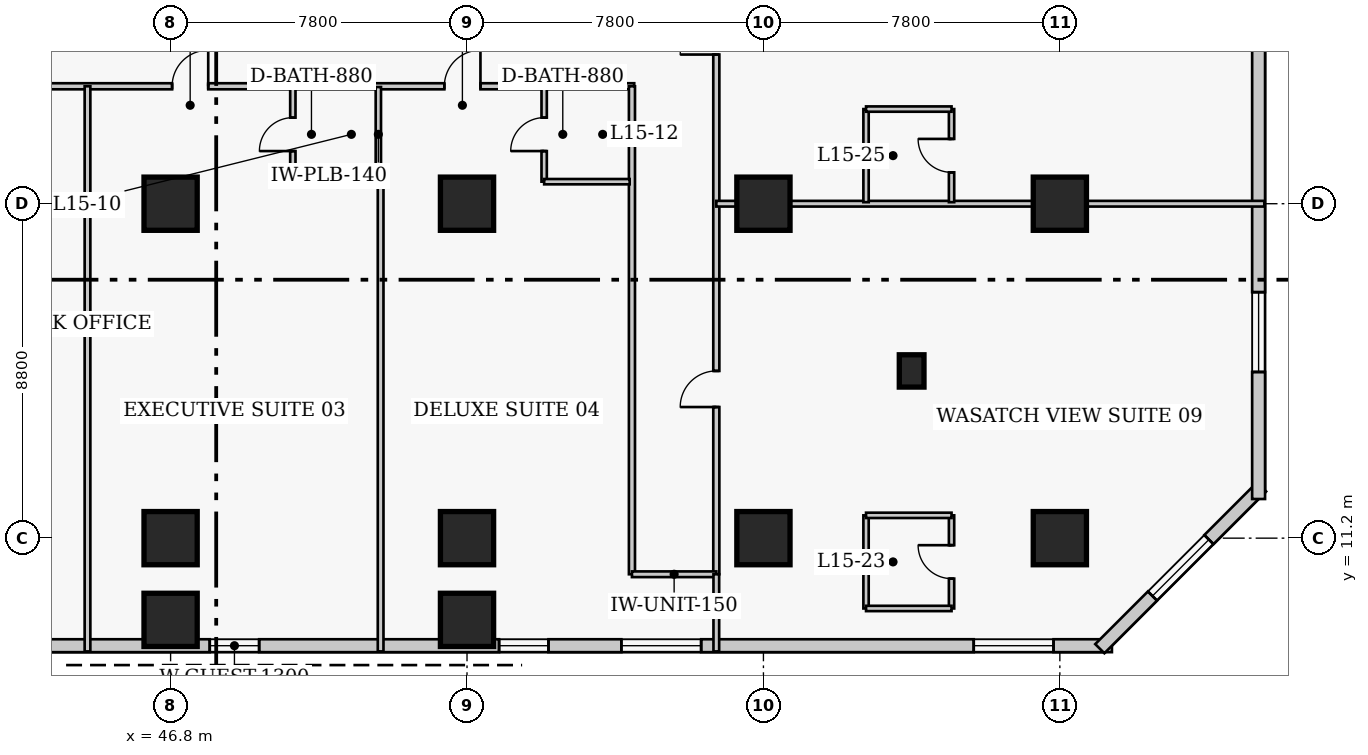
"""IFC4 building model, lengths in metres.
Left out: names, types, materials, properties, quantities, classifications, styles, units other than length and angle.
Written with IfcOpenShell. Run it as: python <this file> out.ifc"""

import sys

from ifc_helpers import new_model, si_unit, direction, frame, frame_2d, origin, origin_2d, place, context, subcontext, project, spatial, rectangle, extrude, element, fill, save


model = new_model("IFC4")
c1 = context("Model", 3, precision=1e-05, world=origin(), true_north=direction((0.0, 1.0)))
c2 = subcontext(c1, "Body", "Model", "MODEL_VIEW")
j1 = project(units=[si_unit("LENGTHUNIT", "METRE"), si_unit("PLANEANGLEUNIT", "RADIAN")], contexts=[c1])
p1 = place(None, origin())
s1 = spatial("IfcSite", under=j1, at=p1, CompositionType="ELEMENT")
p2 = place(p1, origin())
s2 = spatial("IfcBuilding", under=s1, at=p2, CompositionType="ELEMENT")
p3 = place(p2, frame((0.0, 0.0, 64.0)))
s3 = spatial("IfcBuildingStorey", under=s2, at=p3, CompositionType="ELEMENT", Elevation=64.0)
for number, where, z_axis, x_axis in (
    (1, (46.8, 11.2, 0.0), (0.0, 0.0, 1.0), (1.0, 0.0, 0.0)),
    (2, (46.8, 20.0, 0.0), (0.0, 0.0, 1.0), (1.0, 0.0, 0.0)),
    (3, (54.6, 11.2, 0.0), (0.0, 0.0, 1.0), (1.0, 0.0, 0.0)),
    (4, (54.6, 20.0, 0.0), (0.0, 0.0, 1.0), (1.0, 0.0, 0.0)),
    (5, (62.4, 11.2, 0.0), (0.0, 0.0, 1.0), (1.0, 0.0, 0.0)),
    (6, (62.4, 20.0, 0.0), (0.0, 0.0, 1.0), (1.0, 0.0, 0.0)),
    (7, (70.2, 11.2, 0.0), (0.0, 0.0, 1.0), (1.0, 0.0, 0.0)),
    (8, (70.2, 20.0, 0.0), (0.0, 0.0, 1.0), (1.0, 0.0, 0.0)),
    (9, (46.8, 9.05, 0.0), (0.0, 0.0, 1.0), (1.0, 0.0, 0.0)),
    (10, (54.6, 9.05, 0.0), (0.0, 0.0, 1.0), (1.0, 0.0, 0.0)),
):
    element("IfcColumn", number, at=place(p3, frame(where, z_axis=z_axis, x_axis=x_axis)), inside=s3, PredefinedType="COLUMN", context=c2, shape_type="SweptSolid", body=[
        extrude(rectangle(XDim=1.4, YDim=1.4, at=origin_2d()), origin(), (0.0, 0.0, 1.0), 3.8),
    ])
p4 = place(p3, frame((66.3, 15.6, 0.0), z_axis=(0.0, 0.0, 1.0), x_axis=(1.0, 0.0, 0.0)))
e11 = element("IfcColumn", 11, at=p4, inside=s3, PredefinedType="PILASTER", context=c2, shape_type="SweptSolid", body=[
    extrude(rectangle(XDim=0.65, YDim=0.85, at=origin_2d()), origin(), (0.0, 0.0, 1.0), 3.8),
])
p5 = place(p3, frame((41.68, 8.37, 0.0), z_axis=(0.0, 0.0, 1.0), x_axis=(1.0, 0.0, 0.0)))
e12 = element("IfcWall", 12, at=p5, inside=s3, PredefinedType="SOLIDWALL", context=c2, shape_type="SweptSolid", body=[
    extrude(rectangle(XDim=29.89, YDim=0.34, at=frame_2d((14.945, 0.0))), origin(), (0.0, 0.0, 1.0), 3.54),
])
p6 = place(p5, frame((16.981, 0.0, 0.85)))
e13 = element("IfcOpeningElement", 13, at=p6, cuts=e12, PredefinedType="OPENING", context=c2, shape_type="SweptSolid", body=[
    extrude(rectangle(XDim=2.1, YDim=1.85, at=frame_2d((1.05, 0.925))), frame((0.0, 0.18, 0.0), z_axis=(0.0, -1.0, 0.0), x_axis=(1.0, 0.0, 0.0)), (0.0, 0.0, 1.0), 0.36),
])
p7 = place(p5, frame((26.254, 0.0, 0.85)))
e14 = element("IfcOpeningElement", 14, at=p7, cuts=e12, PredefinedType="OPENING", context=c2, shape_type="SweptSolid", body=[
    extrude(rectangle(XDim=2.1, YDim=1.85, at=frame_2d((1.05, 0.925))), frame((0.0, 0.18, 0.0), z_axis=(0.0, -1.0, 0.0), x_axis=(1.0, 0.0, 0.0)), (0.0, 0.0, 1.0), 0.36),
])
p8 = place(p5, frame((6.15, 0.0, 0.85)))
e15 = element("IfcOpeningElement", 15, at=p8, cuts=e12, PredefinedType="OPENING", context=c2, shape_type="SweptSolid", body=[
    extrude(rectangle(XDim=1.3, YDim=1.7, at=frame_2d((0.65, 0.85))), frame((0.0, 0.18, 0.0), z_axis=(0.0, -1.0, 0.0), x_axis=(1.0, 0.0, 0.0)), (0.0, 0.0, 1.0), 0.36),
])
p9 = place(p5, frame((13.763, 0.0, 0.85)))
e16 = element("IfcOpeningElement", 16, at=p9, cuts=e12, PredefinedType="OPENING", context=c2, shape_type="SweptSolid", body=[
    extrude(rectangle(XDim=1.3, YDim=1.7, at=frame_2d((0.65, 0.85))), frame((0.0, 0.18, 0.0), z_axis=(0.0, -1.0, 0.0), x_axis=(1.0, 0.0, 0.0)), (0.0, 0.0, 1.0), 0.36),
])
p10 = place(p3, frame((71.251, 8.292, 0.0), z_axis=(0.0, 0.0, 1.0), x_axis=(0.707106781187, 0.707106781187, 0.0)))
e17 = element("IfcWall", 17, at=p10, inside=s3, PredefinedType="SOLIDWALL", context=c2, shape_type="SweptSolid", body=[
    extrude(rectangle(XDim=6.02, YDim=0.34, at=frame_2d((3.01, 0.0))), origin(), (0.0, 0.0, 1.0), 3.54),
])
p11 = place(p10, frame((1.96, 0.0, 0.85)))
e18 = element("IfcOpeningElement", 18, at=p11, cuts=e17, PredefinedType="OPENING", context=c2, shape_type="SweptSolid", body=[
    extrude(rectangle(XDim=2.1, YDim=1.85, at=frame_2d((1.05, 0.925))), frame((0.0, 0.18, 0.0), z_axis=(0.0, -1.0, 0.0), x_axis=(1.0, 0.0, 0.0)), (0.0, 0.0, 1.0), 0.36),
])
p12 = place(p3, frame((75.43, 12.23, 0.0), z_axis=(0.0, 0.0, 1.0), x_axis=(0.0, 1.0, 0.0)))
e19 = element("IfcWall", 19, at=p12, inside=s3, PredefinedType="SOLIDWALL", context=c2, shape_type="SweptSolid", body=[
    extrude(rectangle(XDim=35.14, YDim=0.34, at=frame_2d((17.57, 0.0))), origin(), (0.0, 0.0, 1.0), 3.54),
])
p13 = place(p12, frame((3.343, 0.0, 0.85)))
e20 = element("IfcOpeningElement", 20, at=p13, cuts=e19, PredefinedType="OPENING", context=c2, shape_type="SweptSolid", body=[
    extrude(rectangle(XDim=2.1, YDim=1.85, at=frame_2d((1.05, 0.925))), frame((0.0, 0.18, 0.0), z_axis=(0.0, -1.0, 0.0), x_axis=(1.0, 0.0, 0.0)), (0.0, 0.0, 1.0), 0.36),
])
p14 = place(p12, frame((12.127, 0.0, 0.85)))
e21 = element("IfcOpeningElement", 21, at=p14, cuts=e19, PredefinedType="OPENING", context=c2, shape_type="SweptSolid", body=[
    extrude(rectangle(XDim=2.1, YDim=1.85, at=frame_2d((1.05, 0.925))), frame((0.0, 0.18, 0.0), z_axis=(0.0, -1.0, 0.0), x_axis=(1.0, 0.0, 0.0)), (0.0, 0.0, 1.0), 0.36),
])
p15 = place(p12, frame((20.913, 0.0, 0.85)))
e22 = element("IfcOpeningElement", 22, at=p15, cuts=e19, PredefinedType="OPENING", context=c2, shape_type="SweptSolid", body=[
    extrude(rectangle(XDim=2.1, YDim=1.85, at=frame_2d((1.05, 0.925))), frame((0.0, 0.18, 0.0), z_axis=(0.0, -1.0, 0.0), x_axis=(1.0, 0.0, 0.0)), (0.0, 0.0, 1.0), 0.36),
])
p16 = place(p12, frame((29.698, 0.0, 0.85)))
e23 = element("IfcOpeningElement", 23, at=p16, cuts=e19, PredefinedType="OPENING", context=c2, shape_type="SweptSolid", body=[
    extrude(rectangle(XDim=2.1, YDim=1.85, at=frame_2d((1.05, 0.925))), frame((0.0, 0.18, 0.0), z_axis=(0.0, -1.0, 0.0), x_axis=(1.0, 0.0, 0.0)), (0.0, 0.0, 1.0), 0.36),
])
p17 = place(p3, frame((35.8, 23.09, 0.0), z_axis=(0.0, 0.0, 1.0), x_axis=(1.0, 0.0, 0.0)))
e24 = element("IfcWall", 24, at=p17, inside=s3, PredefinedType="PARTITIONING", context=c2, shape_type="SweptSolid", body=[
    extrude(rectangle(XDim=23.2, YDim=0.16, at=frame_2d((11.6, 0.0))), origin(), (0.0, 0.0, 1.0), 3.54),
])
p18 = place(p17, frame((3.907, 0.0, 0.0)))
e25 = element("IfcOpeningElement", 25, at=p18, cuts=e24, PredefinedType="OPENING", context=c2, shape_type="SweptSolid", body=[
    extrude(rectangle(XDim=1.0, YDim=2.15, at=frame_2d((0.5, 1.075))), frame((0.0, 0.09, 0.0), z_axis=(0.0, -1.0, 0.0), x_axis=(1.0, 0.0, 0.0)), (0.0, 0.0, 1.0), 0.18),
])
p19 = place(p17, frame((11.04, 0.0, 0.0)))
e26 = element("IfcOpeningElement", 26, at=p19, cuts=e24, PredefinedType="OPENING", context=c2, shape_type="SweptSolid", body=[
    extrude(rectangle(XDim=0.95, YDim=2.1, at=frame_2d((0.475, 1.05))), frame((0.0, 0.09, 0.0), z_axis=(0.0, -1.0, 0.0), x_axis=(1.0, 0.0, 0.0)), (0.0, 0.0, 1.0), 0.18),
])
p20 = place(p17, frame((18.203, 0.0, 0.0)))
e27 = element("IfcOpeningElement", 27, at=p20, cuts=e24, PredefinedType="OPENING", context=c2, shape_type="SweptSolid", body=[
    extrude(rectangle(XDim=0.95, YDim=2.1, at=frame_2d((0.475, 1.05))), frame((0.0, 0.09, 0.0), z_axis=(0.0, -1.0, 0.0), x_axis=(1.0, 0.0, 0.0)), (0.0, 0.0, 1.0), 0.18),
])
p21 = place(p3, frame((61.16, 10.25, 0.0), z_axis=(0.0, 0.0, 1.0), x_axis=(0.0, 1.0, 0.0)))
e28 = element("IfcWall", 28, at=p21, inside=s3, PredefinedType="PARTITIONING", context=c2, shape_type="SweptSolid", body=[
    extrude(rectangle(XDim=30.4, YDim=0.16, at=frame_2d((15.2, 0.0))), origin(), (0.0, 0.0, 1.0), 3.54),
])
p22 = place(p21, frame((4.4, 0.0, 0.0)))
e29 = element("IfcOpeningElement", 29, at=p22, cuts=e28, PredefinedType="OPENING", context=c2, shape_type="SweptSolid", body=[
    extrude(rectangle(XDim=0.95, YDim=2.1, at=frame_2d((0.475, 1.05))), frame((0.0, 0.09, 0.0), z_axis=(0.0, -1.0, 0.0), x_axis=(1.0, 0.0, 0.0)), (0.0, 0.0, 1.0), 0.18),
])
p23 = place(p21, frame((13.675, 0.0, 0.0)))
e30 = element("IfcOpeningElement", 30, at=p23, cuts=e28, PredefinedType="OPENING", context=c2, shape_type="SweptSolid", body=[
    extrude(rectangle(XDim=0.95, YDim=2.1, at=frame_2d((0.475, 1.05))), frame((0.0, 0.09, 0.0), z_axis=(0.0, -1.0, 0.0), x_axis=(1.0, 0.0, 0.0)), (0.0, 0.0, 1.0), 0.18),
])
p24 = place(p21, frame((21.8, 0.0, 0.0)))
e31 = element("IfcOpeningElement", 31, at=p24, cuts=e28, PredefinedType="OPENING", context=c2, shape_type="SweptSolid", body=[
    extrude(rectangle(XDim=0.95, YDim=2.1, at=frame_2d((0.475, 1.05))), frame((0.0, 0.09, 0.0), z_axis=(0.0, -1.0, 0.0), x_axis=(1.0, 0.0, 0.0)), (0.0, 0.0, 1.0), 0.18),
])
p25 = place(p21, frame((28.96, 0.0, 0.0)))
e32 = element("IfcOpeningElement", 32, at=p25, cuts=e28, PredefinedType="OPENING", context=c2, shape_type="SweptSolid", body=[
    extrude(rectangle(XDim=1.0, YDim=2.15, at=frame_2d((0.5, 1.075))), frame((0.0, 0.09, 0.0), z_axis=(0.0, -1.0, 0.0), x_axis=(1.0, 0.0, 0.0)), (0.0, 0.0, 1.0), 0.18),
])
p26 = place(p3, frame((58.94, 10.25, 0.0), z_axis=(0.0, 0.0, 1.0), x_axis=(0.0, 1.0, 0.0)))
e33 = element("IfcWall", 33, at=p26, inside=s3, PredefinedType="PARTITIONING", context=c2, shape_type="SweptSolid", body=[
    extrude(rectangle(XDim=12.84, YDim=0.16, at=frame_2d((6.42, 0.0))), origin(), (0.0, 0.0, 1.0), 3.54),
])
p27 = place(p3, frame((58.94, 10.25, 0.0), z_axis=(0.0, 0.0, 1.0), x_axis=(1.0, 0.0, 0.0)))
e34 = element("IfcWall", 34, at=p27, inside=s3, PredefinedType="PARTITIONING", context=c2, shape_type="SweptSolid", body=[
    extrude(rectangle(XDim=2.22, YDim=0.15, at=frame_2d((1.11, 0.0))), origin(), (0.0, 0.0, 1.0), 3.54),
])
p28 = place(p3, frame((44.613, 8.22, 0.0), z_axis=(0.0, 0.0, 1.0), x_axis=(0.0, 1.0, 0.0)))
e35 = element("IfcWall", 35, at=p28, inside=s3, PredefinedType="PARTITIONING", context=c2, shape_type="SweptSolid", body=[
    extrude(rectangle(XDim=14.87, YDim=0.15, at=frame_2d((7.435, 0.0))), origin(), (0.0, 0.0, 1.0), 3.54),
])
p29 = place(p3, frame((50.017, 20.58, 0.0), z_axis=(0.0, 0.0, 1.0), x_axis=(0.0, 1.0, 0.0)))
e36 = element("IfcWall", 36, at=p29, inside=s3, PredefinedType="PLUMBINGWALL", context=c2, shape_type="SweptSolid", body=[
    extrude(rectangle(XDim=2.49, YDim=0.14, at=frame_2d((1.245, 0.0))), origin(), (0.0, 0.0, 1.0), 3.54),
])
p30 = place(p29, frame((0.805, 0.0, 0.0)))
e37 = element("IfcOpeningElement", 37, at=p30, cuts=e36, PredefinedType="OPENING", context=c2, shape_type="SweptSolid", body=[
    extrude(rectangle(XDim=0.88, YDim=2.05, at=frame_2d((0.44, 1.025))), frame((0.0, 0.08, 0.0), z_axis=(0.0, -1.0, 0.0), x_axis=(1.0, 0.0, 0.0)), (0.0, 0.0, 1.0), 0.16),
])
p31 = place(p3, frame((52.267, 20.58, 0.0), z_axis=(0.0, 0.0, 1.0), x_axis=(0.0, 1.0, 0.0)))
e38 = element("IfcWall", 38, at=p31, inside=s3, PredefinedType="PLUMBINGWALL", context=c2, shape_type="SweptSolid", body=[
    extrude(rectangle(XDim=2.49, YDim=0.14, at=frame_2d((1.245, 0.0))), origin(), (0.0, 0.0, 1.0), 3.54),
])
p32 = place(p3, frame((50.017, 20.58, 0.0), z_axis=(0.0, 0.0, 1.0), x_axis=(1.0, 0.0, 0.0)))
e39 = element("IfcWall", 39, at=p32, inside=s3, PredefinedType="PLUMBINGWALL", context=c2, shape_type="SweptSolid", body=[
    extrude(rectangle(XDim=2.25, YDim=0.14, at=frame_2d((1.125, 0.0))), origin(), (0.0, 0.0, 1.0), 3.54),
])
p33 = place(p3, frame((52.327, 8.22, 0.0), z_axis=(0.0, 0.0, 1.0), x_axis=(0.0, 1.0, 0.0)))
e40 = element("IfcWall", 40, at=p33, inside=s3, PredefinedType="PARTITIONING", context=c2, shape_type="SweptSolid", body=[
    extrude(rectangle(XDim=12.36, YDim=0.15, at=frame_2d((6.18, 0.0))), origin(), (0.0, 0.0, 1.0), 3.54),
])
p34 = place(p3, frame((56.63, 20.58, 0.0), z_axis=(0.0, 0.0, 1.0), x_axis=(0.0, 1.0, 0.0)))
e41 = element("IfcWall", 41, at=p34, inside=s3, PredefinedType="PLUMBINGWALL", context=c2, shape_type="SweptSolid", body=[
    extrude(rectangle(XDim=2.49, YDim=0.14, at=frame_2d((1.245, 0.0))), origin(), (0.0, 0.0, 1.0), 3.54),
])
p35 = place(p34, frame((0.805, 0.0, 0.0)))
e42 = element("IfcOpeningElement", 42, at=p35, cuts=e41, PredefinedType="OPENING", context=c2, shape_type="SweptSolid", body=[
    extrude(rectangle(XDim=0.88, YDim=2.05, at=frame_2d((0.44, 1.025))), frame((0.0, 0.08, 0.0), z_axis=(0.0, -1.0, 0.0), x_axis=(1.0, 0.0, 0.0)), (0.0, 0.0, 1.0), 0.16),
])
p36 = place(p3, frame((56.63, 20.58, 0.0), z_axis=(0.0, 0.0, 1.0), x_axis=(1.0, 0.0, 0.0)))
e43 = element("IfcWall", 43, at=p36, inside=s3, PredefinedType="PLUMBINGWALL", context=c2, shape_type="SweptSolid", body=[
    extrude(rectangle(XDim=2.25, YDim=0.14, at=frame_2d((1.125, 0.0))), origin(), (0.0, 0.0, 1.0), 3.54),
])
p37 = place(p3, frame((61.16, 8.22, 0.0), z_axis=(0.0, 0.0, 1.0), x_axis=(0.0, 1.0, 0.0)))
e44 = element("IfcWall", 44, at=p37, inside=s3, PredefinedType="PARTITIONING", context=c2, shape_type="SweptSolid", body=[
    extrude(rectangle(XDim=2.03, YDim=0.15, at=frame_2d((1.015, 0.0))), origin(), (0.0, 0.0, 1.0), 3.54),
])
p38 = place(p3, frame((65.1, 9.35, 0.0), z_axis=(0.0, 0.0, 1.0), x_axis=(0.0, 1.0, 0.0)))
e45 = element("IfcWall", 45, at=p38, inside=s3, PredefinedType="PLUMBINGWALL", context=c2, shape_type="SweptSolid", body=[
    extrude(rectangle(XDim=2.45, YDim=0.14, at=frame_2d((1.225, 0.0))), origin(), (0.0, 0.0, 1.0), 3.54),
])
p39 = place(p3, frame((67.35, 9.35, 0.0), z_axis=(0.0, 0.0, 1.0), x_axis=(0.0, 1.0, 0.0)))
e46 = element("IfcWall", 46, at=p39, inside=s3, PredefinedType="PLUMBINGWALL", context=c2, shape_type="SweptSolid", body=[
    extrude(rectangle(XDim=2.45, YDim=0.14, at=frame_2d((1.225, 0.0))), origin(), (0.0, 0.0, 1.0), 3.54),
])
p40 = place(p39, frame((0.785, 0.0, 0.0)))
e47 = element("IfcOpeningElement", 47, at=p40, cuts=e46, PredefinedType="OPENING", context=c2, shape_type="SweptSolid", body=[
    extrude(rectangle(XDim=0.88, YDim=2.05, at=frame_2d((0.44, 1.025))), frame((0.0, 0.08, 0.0), z_axis=(0.0, -1.0, 0.0), x_axis=(1.0, 0.0, 0.0)), (0.0, 0.0, 1.0), 0.16),
])
for number, where, z_axis, x_axis in (
    (48, (65.1, 9.35, 0.0), (0.0, 0.0, 1.0), (1.0, 0.0, 0.0)),
    (49, (65.1, 11.8, 0.0), (0.0, 0.0, 1.0), (1.0, 0.0, 0.0)),
):
    element("IfcWall", number, at=place(p3, frame(where, z_axis=z_axis, x_axis=x_axis)), inside=s3, PredefinedType="PLUMBINGWALL", context=c2, shape_type="SweptSolid", body=[
        extrude(rectangle(XDim=2.25, YDim=0.14, at=frame_2d((1.125, 0.0))), origin(), (0.0, 0.0, 1.0), 3.54),
    ])
p41 = place(p3, frame((61.16, 20.0, 0.0), z_axis=(0.0, 0.0, 1.0), x_axis=(1.0, 0.0, 0.0)))
e50 = element("IfcWall", 50, at=p41, inside=s3, PredefinedType="PARTITIONING", context=c2, shape_type="SweptSolid", body=[
    extrude(rectangle(XDim=14.42, YDim=0.15, at=frame_2d((7.21, 0.0))), origin(), (0.0, 0.0, 1.0), 2.593),
])
p42 = place(p3, frame((65.1, 20.04, 0.0), z_axis=(0.0, 0.0, 1.0), x_axis=(0.0, 1.0, 0.0)))
e51 = element("IfcWall", 51, at=p42, inside=s3, PredefinedType="PLUMBINGWALL", context=c2, shape_type="SweptSolid", body=[
    extrude(rectangle(XDim=2.45, YDim=0.14, at=frame_2d((1.225, 0.0))), origin(), (0.0, 0.0, 1.0), 3.54),
])
p43 = place(p3, frame((67.35, 20.04, 0.0), z_axis=(0.0, 0.0, 1.0), x_axis=(0.0, 1.0, 0.0)))
e52 = element("IfcWall", 52, at=p43, inside=s3, PredefinedType="PLUMBINGWALL", context=c2, shape_type="SweptSolid", body=[
    extrude(rectangle(XDim=2.45, YDim=0.14, at=frame_2d((1.225, 0.0))), origin(), (0.0, 0.0, 1.0), 3.54),
])
p44 = place(p43, frame((0.785, 0.0, 0.0)))
e53 = element("IfcOpeningElement", 53, at=p44, cuts=e52, PredefinedType="OPENING", context=c2, shape_type="SweptSolid", body=[
    extrude(rectangle(XDim=0.88, YDim=2.05, at=frame_2d((0.44, 1.025))), frame((0.0, 0.08, 0.0), z_axis=(0.0, -1.0, 0.0), x_axis=(1.0, 0.0, 0.0)), (0.0, 0.0, 1.0), 0.16),
])
p45 = place(p3, frame((65.1, 22.49, 0.0), z_axis=(0.0, 0.0, 1.0), x_axis=(1.0, 0.0, 0.0)))
e54 = element("IfcWall", 54, at=p45, inside=s3, PredefinedType="PLUMBINGWALL", context=c2, shape_type="SweptSolid", body=[
    extrude(rectangle(XDim=2.25, YDim=0.14, at=frame_2d((1.125, 0.0))), origin(), (0.0, 0.0, 1.0), 3.54),
])
p46 = place(p6, origin())
e55 = element("IfcWindow", 55, at=p46, inside=s3, PartitioningType="SINGLE_PANEL", PredefinedType="WINDOW", context=c2, shape_type="SweptSolid", body=[
    extrude(rectangle(XDim=2.1, YDim=1.85, at=frame_2d((1.05, 0.925))), frame((0.0, 0.03, 0.0), z_axis=(0.0, -1.0, 0.0), x_axis=(1.0, 0.0, 0.0)), (0.0, 0.0, 1.0), 0.06),
])
fill(e13, e55)
p47 = place(p7, origin())
e56 = element("IfcWindow", 56, at=p47, inside=s3, PartitioningType="SINGLE_PANEL", PredefinedType="WINDOW", context=c2, shape_type="SweptSolid", body=[
    extrude(rectangle(XDim=2.1, YDim=1.85, at=frame_2d((1.05, 0.925))), frame((0.0, 0.03, 0.0), z_axis=(0.0, -1.0, 0.0), x_axis=(1.0, 0.0, 0.0)), (0.0, 0.0, 1.0), 0.06),
])
fill(e14, e56)
p48 = place(p11, origin())
e57 = element("IfcWindow", 57, at=p48, inside=s3, PartitioningType="SINGLE_PANEL", PredefinedType="WINDOW", context=c2, shape_type="SweptSolid", body=[
    extrude(rectangle(XDim=2.1, YDim=1.85, at=frame_2d((1.05, 0.925))), frame((0.0, 0.03, 0.0), z_axis=(0.0, -1.0, 0.0), x_axis=(1.0, 0.0, 0.0)), (0.0, 0.0, 1.0), 0.06),
])
fill(e18, e57)
p49 = place(p13, origin())
e58 = element("IfcWindow", 58, at=p49, inside=s3, PartitioningType="SINGLE_PANEL", PredefinedType="WINDOW", context=c2, shape_type="SweptSolid", body=[
    extrude(rectangle(XDim=2.1, YDim=1.85, at=frame_2d((1.05, 0.925))), frame((0.0, 0.03, 0.0), z_axis=(0.0, -1.0, 0.0), x_axis=(1.0, 0.0, 0.0)), (0.0, 0.0, 1.0), 0.06),
])
fill(e20, e58)
p50 = place(p8, origin())
e59 = element("IfcWindow", 59, at=p50, inside=s3, PartitioningType="SINGLE_PANEL", PredefinedType="WINDOW", context=c2, shape_type="SweptSolid", body=[
    extrude(rectangle(XDim=1.3, YDim=1.7, at=frame_2d((0.65, 0.85))), frame((0.0, 0.03, 0.0), z_axis=(0.0, -1.0, 0.0), x_axis=(1.0, 0.0, 0.0)), (0.0, 0.0, 1.0), 0.06),
])
fill(e15, e59)
p51 = place(p9, origin())
e60 = element("IfcWindow", 60, at=p51, inside=s3, PartitioningType="SINGLE_PANEL", PredefinedType="WINDOW", context=c2, shape_type="SweptSolid", body=[
    extrude(rectangle(XDim=1.3, YDim=1.7, at=frame_2d((0.65, 0.85))), frame((0.0, 0.03, 0.0), z_axis=(0.0, -1.0, 0.0), x_axis=(1.0, 0.0, 0.0)), (0.0, 0.0, 1.0), 0.06),
])
fill(e16, e60)
p52 = place(p30, origin())
e61 = element("IfcDoor", 61, at=p52, inside=s3, OperationType="SINGLE_SWING_LEFT", PredefinedType="DOOR", context=c2, shape_type="SweptSolid", body=[
    extrude(rectangle(XDim=0.88, YDim=2.05, at=frame_2d((0.44, 1.025))), frame((0.0, 0.025, 0.0), z_axis=(0.0, -1.0, 0.0), x_axis=(1.0, 0.0, 0.0)), (0.0, 0.0, 1.0), 0.05),
])
fill(e37, e61)
p53 = place(p19, origin())
e62 = element("IfcDoor", 62, at=p53, inside=s3, OperationType="SINGLE_SWING_RIGHT", PredefinedType="DOOR", context=c2, shape_type="SweptSolid", body=[
    extrude(rectangle(XDim=0.95, YDim=2.1, at=frame_2d((0.475, 1.05))), frame((0.0, 0.025, 0.0), z_axis=(0.0, -1.0, 0.0), x_axis=(1.0, 0.0, 0.0)), (0.0, 0.0, 1.0), 0.05),
])
fill(e26, e62)
p54 = place(p35, origin())
e63 = element("IfcDoor", 63, at=p54, inside=s3, OperationType="SINGLE_SWING_LEFT", PredefinedType="DOOR", context=c2, shape_type="SweptSolid", body=[
    extrude(rectangle(XDim=0.88, YDim=2.05, at=frame_2d((0.44, 1.025))), frame((0.0, 0.025, 0.0), z_axis=(0.0, -1.0, 0.0), x_axis=(1.0, 0.0, 0.0)), (0.0, 0.0, 1.0), 0.05),
])
fill(e42, e63)
p55 = place(p20, origin())
e64 = element("IfcDoor", 64, at=p55, inside=s3, OperationType="SINGLE_SWING_RIGHT", PredefinedType="DOOR", context=c2, shape_type="SweptSolid", body=[
    extrude(rectangle(XDim=0.95, YDim=2.1, at=frame_2d((0.475, 1.05))), frame((0.0, 0.025, 0.0), z_axis=(0.0, -1.0, 0.0), x_axis=(1.0, 0.0, 0.0)), (0.0, 0.0, 1.0), 0.05),
])
fill(e27, e64)
p56 = place(p40, origin())
e65 = element("IfcDoor", 65, at=p56, inside=s3, OperationType="SINGLE_SWING_RIGHT", PredefinedType="DOOR", context=c2, shape_type="SweptSolid", body=[
    extrude(rectangle(XDim=0.88, YDim=2.05, at=frame_2d((0.44, 1.025))), frame((0.0, 0.025, 0.0), z_axis=(0.0, -1.0, 0.0), x_axis=(1.0, 0.0, 0.0)), (0.0, 0.0, 1.0), 0.05),
])
fill(e47, e65)
p57 = place(p22, origin())
e66 = element("IfcDoor", 66, at=p57, inside=s3, OperationType="SINGLE_SWING_LEFT", PredefinedType="DOOR", context=c2, shape_type="SweptSolid", body=[
    extrude(rectangle(XDim=0.95, YDim=2.1, at=frame_2d((0.475, 1.05))), frame((0.0, 0.025, 0.0), z_axis=(0.0, -1.0, 0.0), x_axis=(1.0, 0.0, 0.0)), (0.0, 0.0, 1.0), 0.05),
])
fill(e29, e66)
p58 = place(p44, origin())
e67 = element("IfcDoor", 67, at=p58, inside=s3, OperationType="SINGLE_SWING_RIGHT", PredefinedType="DOOR", context=c2, shape_type="SweptSolid", body=[
    extrude(rectangle(XDim=0.88, YDim=2.05, at=frame_2d((0.44, 1.025))), frame((0.0, 0.025, 0.0), z_axis=(0.0, -1.0, 0.0), x_axis=(1.0, 0.0, 0.0)), (0.0, 0.0, 1.0), 0.05),
])
fill(e53, e67)
p59 = place(p23, origin())
e68 = element("IfcDoor", 68, at=p59, inside=s3, OperationType="SINGLE_SWING_LEFT", PredefinedType="DOOR", context=c2, shape_type="SweptSolid", body=[
    extrude(rectangle(XDim=0.95, YDim=2.1, at=frame_2d((0.475, 1.05))), frame((0.0, 0.025, 0.0), z_axis=(0.0, -1.0, 0.0), x_axis=(1.0, 0.0, 0.0)), (0.0, 0.0, 1.0), 0.05),
])
fill(e30, e68)
save(model, sys.argv[1])
